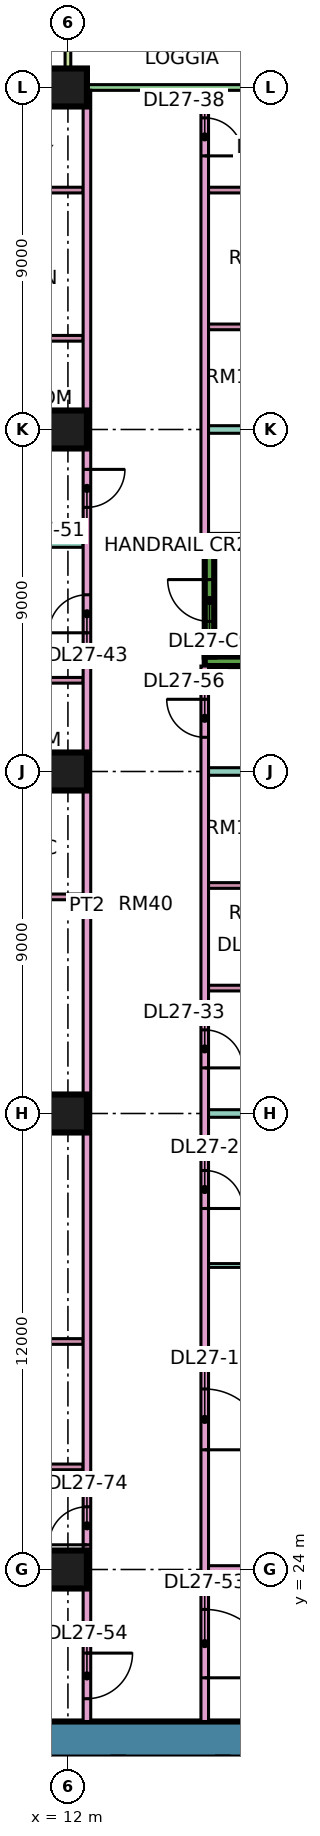
"""IFC4 building model, lengths in metres.
Left out: names, types, materials, properties, quantities, classifications, styles, units other than length and angle.
Written with IfcOpenShell. Run it as: python <this file> out.ifc"""

import sys

from ifc_helpers import new_model, si_unit, direction, frame, frame_2d, origin, origin_2d, place, context, subcontext, project, spatial, rectangle, extrude, element, fill, save


model = new_model("IFC4")
c1 = context("Model", 3, precision=1e-05, world=origin(), true_north=direction((0.0, 1.0)))
c2 = subcontext(c1, "Body", "Model", "MODEL_VIEW")
j1 = project(units=[si_unit("LENGTHUNIT", "METRE"), si_unit("PLANEANGLEUNIT", "RADIAN")], contexts=[c1])
p1 = place(None, origin())
s1 = spatial("IfcSite", under=j1, at=p1, CompositionType="ELEMENT")
p2 = place(p1, origin())
s2 = spatial("IfcBuilding", under=s1, at=p2, CompositionType="ELEMENT")
p3 = place(p2, frame((0.0, 0.0, 118.15)))
s3 = spatial("IfcBuildingStorey", under=s2, at=p3, CompositionType="ELEMENT", Elevation=118.15)
for number, where, z_axis, x_axis in (
    (1, (12.0, 24.0, 0.0), (0.0, 0.0, 1.0), (1.0, 0.0, 0.0)),
    (2, (12.0, 36.0, 0.0), (0.0, 0.0, 1.0), (1.0, 0.0, 0.0)),
    (3, (12.0, 45.0, 0.0), (0.0, 0.0, 1.0), (1.0, 0.0, 0.0)),
    (4, (12.0, 54.0, 0.0), (0.0, 0.0, 1.0), (1.0, 0.0, 0.0)),
    (5, (12.0, 63.0, 0.0), (0.0, 0.0, 1.0), (1.0, 0.0, 0.0)),
):
    element("IfcColumn", number, at=place(p3, frame(where, z_axis=z_axis, x_axis=x_axis)), inside=s3, PredefinedType="COLUMN", context=c2, shape_type="SweptSolid", body=[
        extrude(rectangle(XDim=1.0, YDim=1.0, at=origin_2d()), origin(), (0.0, 0.0, 1.0), 3.75),
    ])
p4 = place(p3, frame((9.0, 19.525, 0.0), z_axis=(0.0, 0.0, 1.0), x_axis=(1.0, 0.0, 0.0)))
e6 = element("IfcWall", 6, at=p4, inside=s3, PredefinedType="SHEAR", context=c2, shape_type="SweptSolid", body=[
    extrude(rectangle(XDim=25.0, YDim=0.95, at=frame_2d((12.5, 0.0))), origin(), (0.0, 0.0, 1.0), 3.75),
])
p5 = place(p4, frame((19.1, 0.0, 0.0)))
e7 = element("IfcOpeningElement", 7, at=p5, cuts=e6, PredefinedType="OPENING", context=c2, shape_type="SweptSolid", body=[
    extrude(rectangle(XDim=1.8, YDim=2.4, at=frame_2d((0.9, 1.2))), frame((0.0, 0.485, 0.0), z_axis=(0.0, -1.0, 0.0), x_axis=(1.0, 0.0, 0.0)), (0.0, 0.0, 1.0), 0.97),
])
for number, where, z_axis, x_axis in (
    (8, (15.6, 47.9, 0.0), (0.0, 0.0, 1.0), (1.0, 0.0, 0.0)),
    (9, (15.6, 51.1, 0.0), (0.0, 0.0, 1.0), (1.0, 0.0, 0.0)),
):
    element("IfcWall", number, at=place(p3, frame(where, z_axis=z_axis, x_axis=x_axis)), inside=s3, PredefinedType="SHEAR", context=c2, shape_type="SweptSolid", body=[
        extrude(rectangle(XDim=7.0, YDim=0.25, at=frame_2d((3.5, 0.0))), origin(), (0.0, 0.0, 1.0), 3.75),
    ])
p6 = place(p3, frame((15.725, 48.025, 0.0), z_axis=(0.0, 0.0, 1.0), x_axis=(0.0, 1.0, 0.0)))
e10 = element("IfcWall", 10, at=p6, inside=s3, PredefinedType="SHEAR", context=c2, shape_type="SweptSolid", body=[
    extrude(rectangle(XDim=2.95, YDim=0.25, at=frame_2d((1.475, 0.0))), origin(), (0.0, 0.0, 1.0), 3.75),
])
p7 = place(p6, frame((0.925, 0.0, 0.0)))
e11 = element("IfcOpeningElement", 11, at=p7, cuts=e10, PredefinedType="OPENING", context=c2, shape_type="SweptSolid", body=[
    extrude(rectangle(XDim=1.1, YDim=2.2, at=frame_2d((0.55, 1.1))), frame((0.0, 0.135, 0.0), z_axis=(0.0, -1.0, 0.0), x_axis=(1.0, 0.0, 0.0)), (0.0, 0.0, 1.0), 0.27),
])
p8 = place(p3, frame((22.425, 63.0, 0.0), z_axis=(0.0, 0.0, 1.0), x_axis=(-1.0, 0.0, 0.0)))
e12 = element("IfcWall", 12, at=p8, inside=s3, PredefinedType="SOLIDWALL", context=c2, shape_type="SweptSolid", body=[
    extrude(rectangle(XDim=10.35, YDim=0.15, at=frame_2d((5.175, 0.0))), origin(), (0.0, 0.0, 1.0), 3.35),
])
p9 = place(p8, frame((0.562, 0.0, 0.45)))
e13 = element("IfcOpeningElement", 13, at=p9, cuts=e12, PredefinedType="OPENING", context=c2, shape_type="SweptSolid", body=[
    extrude(rectangle(XDim=1.8, YDim=2.4, at=frame_2d((0.9, 1.2))), frame((0.0, 0.085, 0.0), z_axis=(0.0, -1.0, 0.0), x_axis=(1.0, 0.0, 0.0)), (0.0, 0.0, 1.0), 0.17),
])
p10 = place(p8, frame((3.975, 0.0, 0.0)))
e14 = element("IfcOpeningElement", 14, at=p10, cuts=e12, PredefinedType="OPENING", context=c2, shape_type="SweptSolid", body=[
    extrude(rectangle(XDim=1.8, YDim=2.4, at=frame_2d((0.9, 1.2))), frame((0.0, 0.085, 0.0), z_axis=(0.0, -1.0, 0.0), x_axis=(1.0, 0.0, 0.0)), (0.0, 0.0, 1.0), 0.17),
])
p11 = place(p3, frame((12.0, 64.5, 0.0), z_axis=(0.0, 0.0, 1.0), x_axis=(0.0, -1.0, 0.0)))
e15 = element("IfcWall", 15, at=p11, inside=s3, PredefinedType="SOLIDWALL", context=c2, shape_type="SweptSolid", body=[
    extrude(rectangle(XDim=1.5, YDim=0.15, at=frame_2d((0.75, 0.0))), origin(), (0.0, 0.0, 1.0), 3.35),
])
p12 = place(p3, frame((0.0, 36.0, 0.0), z_axis=(0.0, 0.0, 1.0), x_axis=(1.0, 0.0, 0.0)))
e16 = element("IfcWall", 16, at=p12, inside=s3, PredefinedType="PARTITIONING", context=c2, shape_type="SweptSolid", body=[
    extrude(rectangle(XDim=12.4, YDim=0.2, at=frame_2d((6.2, 0.0))), origin(), (0.0, 0.0, 1.0), 3.35),
])
p13 = place(p3, frame((-1.35, 51.0, 0.0), z_axis=(0.0, 0.0, 1.0), x_axis=(1.0, 0.0, 0.0)))
e17 = element("IfcWall", 17, at=p13, inside=s3, PredefinedType="PARTITIONING", context=c2, shape_type="SweptSolid", body=[
    extrude(rectangle(XDim=13.75, YDim=0.2, at=frame_2d((6.875, 0.0))), origin(), (0.0, 0.0, 1.0), 3.35),
])
p14 = place(p3, frame((0.074, 22.4, 0.0), z_axis=(0.0, 0.0, 1.0), x_axis=(1.0, 0.0, 0.0)))
e18 = element("IfcWall", 18, at=p14, inside=s3, PredefinedType="PARTITIONING", context=c2, shape_type="SweptSolid", body=[
    extrude(rectangle(XDim=12.326, YDim=0.2, at=frame_2d((6.163, 0.0))), origin(), (0.0, 0.0, 1.0), 3.35),
])
for number, where, z_axis, x_axis in (
    (19, (7.775, 26.7, 0.0), (0.0, 0.0, 1.0), (1.0, 0.0, 0.0)),
    (20, (7.775, 30.0, 0.0), (0.0, 0.0, 1.0), (1.0, 0.0, 0.0)),
    (21, (7.775, 41.7, 0.0), (0.0, 0.0, 1.0), (1.0, 0.0, 0.0)),
    (22, (7.775, 45.0, 0.0), (0.0, 0.0, 1.0), (1.0, 0.0, 0.0)),
    (23, (7.775, 47.4, 0.0), (0.0, 0.0, 1.0), (1.0, 0.0, 0.0)),
):
    element("IfcWall", number, at=place(p3, frame(where, z_axis=z_axis, x_axis=x_axis)), inside=s3, PredefinedType="PARTITIONING", context=c2, shape_type="SweptSolid", body=[
        extrude(rectangle(XDim=4.625, YDim=0.15, at=frame_2d((2.312, 0.0))), origin(), (0.0, 0.0, 1.0), 3.35),
    ])
for number, where, z_axis, x_axis in (
    (24, (8.375, 54.0, 0.0), (0.0, 0.0, 1.0), (1.0, 0.0, 0.0)),
    (25, (8.375, 56.4, 0.0), (0.0, 0.0, 1.0), (1.0, 0.0, 0.0)),
    (26, (8.375, 60.3, 0.0), (0.0, 0.0, 1.0), (1.0, 0.0, 0.0)),
):
    element("IfcWall", number, at=place(p3, frame(where, z_axis=z_axis, x_axis=x_axis)), inside=s3, PredefinedType="PARTITIONING", context=c2, shape_type="SweptSolid", body=[
        extrude(rectangle(XDim=4.025, YDim=0.15, at=frame_2d((2.012, 0.0))), origin(), (0.0, 0.0, 1.0), 3.35),
    ])
p15 = place(p3, frame((12.5, 20.0, 0.0), z_axis=(0.0, 0.0, 1.0), x_axis=(0.0, 1.0, 0.0)))
e27 = element("IfcWall", 27, at=p15, inside=s3, PredefinedType="PARTITIONING", context=c2, shape_type="SweptSolid", body=[
    extrude(rectangle(XDim=42.926, YDim=0.2, at=frame_2d((21.463, 0.0))), origin(), (0.0, 0.0, 1.0), 3.35),
])
p16 = place(p15, frame((28.65, 0.0, 0.0)))
e28 = element("IfcOpeningElement", 28, at=p16, cuts=e27, PredefinedType="OPENING", context=c2, shape_type="SweptSolid", body=[
    extrude(rectangle(XDim=1.0, YDim=2.1, at=frame_2d((0.5, 1.05))), frame((0.0, 0.11, 0.0), z_axis=(0.0, -1.0, 0.0), x_axis=(1.0, 0.0, 0.0)), (0.0, 0.0, 1.0), 0.22),
])
p17 = place(p15, frame((31.95, 0.0, 0.0)))
e29 = element("IfcOpeningElement", 29, at=p17, cuts=e27, PredefinedType="OPENING", context=c2, shape_type="SweptSolid", body=[
    extrude(rectangle(XDim=1.0, YDim=2.1, at=frame_2d((0.5, 1.05))), frame((0.0, 0.11, 0.0), z_axis=(0.0, -1.0, 0.0), x_axis=(1.0, 0.0, 0.0)), (0.0, 0.0, 1.0), 0.22),
])
p18 = place(p15, frame((0.6, 0.0, 0.0)))
e30 = element("IfcOpeningElement", 30, at=p18, cuts=e27, PredefinedType="OPENING", context=c2, shape_type="SweptSolid", body=[
    extrude(rectangle(XDim=1.2, YDim=2.1, at=frame_2d((0.6, 1.05))), frame((0.0, 0.11, 0.0), z_axis=(0.0, -1.0, 0.0), x_axis=(1.0, 0.0, 0.0)), (0.0, 0.0, 1.0), 0.22),
])
p19 = place(p15, frame((4.65, 0.0, 0.0)))
e31 = element("IfcOpeningElement", 31, at=p19, cuts=e27, PredefinedType="OPENING", context=c2, shape_type="SweptSolid", body=[
    extrude(rectangle(XDim=1.0, YDim=2.1, at=frame_2d((0.5, 1.05))), frame((0.0, 0.11, 0.0), z_axis=(0.0, -1.0, 0.0), x_axis=(1.0, 0.0, 0.0)), (0.0, 0.0, 1.0), 0.22),
])
p20 = place(p3, frame((15.6, 20.0, 0.0), z_axis=(0.0, 0.0, 1.0), x_axis=(0.0, 1.0, 0.0)))
e32 = element("IfcWall", 32, at=p20, inside=s3, PredefinedType="PARTITIONING", context=c2, shape_type="SweptSolid", body=[
    extrude(rectangle(XDim=27.775, YDim=0.2, at=frame_2d((13.887, 0.0))), origin(), (0.0, 0.0, 1.0), 3.35),
])
p21 = place(p20, frame((7.15, 0.0, 0.0)))
e33 = element("IfcOpeningElement", 33, at=p21, cuts=e32, PredefinedType="OPENING", context=c2, shape_type="SweptSolid", body=[
    extrude(rectangle(XDim=1.6, YDim=2.1, at=frame_2d((0.8, 1.05))), frame((0.0, 0.11, 0.0), z_axis=(0.0, -1.0, 0.0), x_axis=(1.0, 0.0, 0.0)), (0.0, 0.0, 1.0), 0.22),
])
p22 = place(p20, frame((13.5, 0.0, 0.0)))
e34 = element("IfcOpeningElement", 34, at=p22, cuts=e32, PredefinedType="OPENING", context=c2, shape_type="SweptSolid", body=[
    extrude(rectangle(XDim=1.0, YDim=2.1, at=frame_2d((0.5, 1.05))), frame((0.0, 0.11, 0.0), z_axis=(0.0, -1.0, 0.0), x_axis=(1.0, 0.0, 0.0)), (0.0, 0.0, 1.0), 0.22),
])
p23 = place(p20, frame((17.2, 0.0, 0.0)))
e35 = element("IfcOpeningElement", 35, at=p23, cuts=e32, PredefinedType="OPENING", context=c2, shape_type="SweptSolid", body=[
    extrude(rectangle(XDim=1.0, YDim=2.1, at=frame_2d((0.5, 1.05))), frame((0.0, 0.11, 0.0), z_axis=(0.0, -1.0, 0.0), x_axis=(1.0, 0.0, 0.0)), (0.0, 0.0, 1.0), 0.22),
])
p24 = place(p20, frame((1.15, 0.0, 0.0)))
e36 = element("IfcOpeningElement", 36, at=p24, cuts=e32, PredefinedType="OPENING", context=c2, shape_type="SweptSolid", body=[
    extrude(rectangle(XDim=1.8, YDim=2.1, at=frame_2d((0.9, 1.05))), frame((0.0, 0.11, 0.0), z_axis=(0.0, -1.0, 0.0), x_axis=(1.0, 0.0, 0.0)), (0.0, 0.0, 1.0), 0.22),
])
p25 = place(p20, frame((25.9, 0.0, 0.0)))
e37 = element("IfcOpeningElement", 37, at=p25, cuts=e32, PredefinedType="OPENING", context=c2, shape_type="SweptSolid", body=[
    extrude(rectangle(XDim=1.0, YDim=2.1, at=frame_2d((0.5, 1.05))), frame((0.0, 0.11, 0.0), z_axis=(0.0, -1.0, 0.0), x_axis=(1.0, 0.0, 0.0)), (0.0, 0.0, 1.0), 0.22),
])
p26 = place(p3, frame((15.6, 51.225, 0.0), z_axis=(0.0, 0.0, 1.0), x_axis=(0.0, 1.0, 0.0)))
e38 = element("IfcWall", 38, at=p26, inside=s3, PredefinedType="PARTITIONING", context=c2, shape_type="SweptSolid", body=[
    extrude(rectangle(XDim=11.701, YDim=0.2, at=frame_2d((5.851, 0.0))), origin(), (0.0, 0.0, 1.0), 3.35),
])
p27 = place(p26, frame((9.975, 0.0, 0.0)))
e39 = element("IfcOpeningElement", 39, at=p27, cuts=e38, PredefinedType="OPENING", context=c2, shape_type="SweptSolid", body=[
    extrude(rectangle(XDim=1.0, YDim=2.1, at=frame_2d((0.5, 1.05))), frame((0.0, 0.11, 0.0), z_axis=(0.0, -1.0, 0.0), x_axis=(1.0, 0.0, 0.0)), (0.0, 0.0, 1.0), 0.22),
])
p28 = place(p3, frame((15.7, 24.0, 0.0), z_axis=(0.0, 0.0, 1.0), x_axis=(1.0, 0.0, 0.0)))
e40 = element("IfcWall", 40, at=p28, inside=s3, PredefinedType="PARTITIONING", context=c2, shape_type="SweptSolid", body=[
    extrude(rectangle(XDim=5.8, YDim=0.2, at=frame_2d((2.9, 0.0))), origin(), (0.0, 0.0, 1.0), 3.35),
])
p29 = place(p3, frame((15.7, 32.0, 0.0), z_axis=(0.0, 0.0, 1.0), x_axis=(1.0, 0.0, 0.0)))
e41 = element("IfcWall", 41, at=p29, inside=s3, PredefinedType="PARTITIONING", context=c2, shape_type="SweptSolid", body=[
    extrude(rectangle(XDim=5.8, YDim=0.1, at=frame_2d((2.9, 0.0))), origin(), (0.0, 0.0, 1.0), 3.35),
])
p30 = place(p3, frame((15.7, 36.0, 0.0), z_axis=(0.0, 0.0, 1.0), x_axis=(1.0, 0.0, 0.0)))
e42 = element("IfcWall", 42, at=p30, inside=s3, PredefinedType="PARTITIONING", context=c2, shape_type="SweptSolid", body=[
    extrude(rectangle(XDim=8.3, YDim=0.2, at=frame_2d((4.15, 0.0))), origin(), (0.0, 0.0, 1.0), 3.35),
])
p31 = place(p3, frame((15.7, 39.3, 0.0), z_axis=(0.0, 0.0, 1.0), x_axis=(1.0, 0.0, 0.0)))
e43 = element("IfcWall", 43, at=p31, inside=s3, PredefinedType="PARTITIONING", context=c2, shape_type="SweptSolid", body=[
    extrude(rectangle(XDim=2.525, YDim=0.15, at=frame_2d((1.263, 0.0))), origin(), (0.0, 0.0, 1.0), 3.35),
])
p32 = place(p31, frame((0.9, 0.0, 0.0)))
e44 = element("IfcOpeningElement", 44, at=p32, cuts=e43, PredefinedType="OPENING", context=c2, shape_type="SweptSolid", body=[
    extrude(rectangle(XDim=0.8, YDim=2.1, at=frame_2d((0.4, 1.05))), frame((0.0, 0.085, 0.0), z_axis=(0.0, -1.0, 0.0), x_axis=(1.0, 0.0, 0.0)), (0.0, 0.0, 1.0), 0.17),
])
p33 = place(p3, frame((15.7, 42.0, 0.0), z_axis=(0.0, 0.0, 1.0), x_axis=(1.0, 0.0, 0.0)))
e45 = element("IfcWall", 45, at=p33, inside=s3, PredefinedType="PARTITIONING", context=c2, shape_type="SweptSolid", body=[
    extrude(rectangle(XDim=2.525, YDim=0.15, at=frame_2d((1.263, 0.0))), origin(), (0.0, 0.0, 1.0), 3.35),
])
p34 = place(p3, frame((15.7, 45.0, 0.0), z_axis=(0.0, 0.0, 1.0), x_axis=(1.0, 0.0, 0.0)))
e46 = element("IfcWall", 46, at=p34, inside=s3, PredefinedType="PARTITIONING", context=c2, shape_type="SweptSolid", body=[
    extrude(rectangle(XDim=8.226, YDim=0.2, at=frame_2d((4.113, 0.0))), origin(), (0.0, 0.0, 1.0), 3.35),
])
p35 = place(p3, frame((15.7, 54.0, 0.0), z_axis=(0.0, 0.0, 1.0), x_axis=(1.0, 0.0, 0.0)))
e47 = element("IfcWall", 47, at=p35, inside=s3, PredefinedType="PARTITIONING", context=c2, shape_type="SweptSolid", body=[
    extrude(rectangle(XDim=8.3, YDim=0.2, at=frame_2d((4.15, 0.0))), origin(), (0.0, 0.0, 1.0), 3.35),
])
for number, where, z_axis, x_axis in (
    (48, (15.7, 56.7, 0.0), (0.0, 0.0, 1.0), (1.0, 0.0, 0.0)),
    (49, (15.7, 60.3, 0.0), (0.0, 0.0, 1.0), (1.0, 0.0, 0.0)),
):
    element("IfcWall", number, at=place(p3, frame(where, z_axis=z_axis, x_axis=x_axis)), inside=s3, PredefinedType="PARTITIONING", context=c2, shape_type="SweptSolid", body=[
        extrude(rectangle(XDim=2.525, YDim=0.15, at=frame_2d((1.263, 0.0))), origin(), (0.0, 0.0, 1.0), 3.35),
    ])
p36 = place(p7, frame((1.1, 0.0, 0.0), z_axis=(0.0, 0.0, 1.0), x_axis=(-1.0, 0.0, 0.0)))
e50 = element("IfcDoor", 50, at=p36, inside=s3, OperationType="SINGLE_SWING_RIGHT", PredefinedType="DOOR", context=c2, shape_type="SweptSolid", body=[
    extrude(rectangle(XDim=1.1, YDim=2.2, at=frame_2d((0.55, 1.1))), frame((0.0, 0.025, 0.0), z_axis=(0.0, -1.0, 0.0), x_axis=(1.0, 0.0, 0.0)), (0.0, 0.0, 1.0), 0.05),
])
fill(e11, e50)
p37 = place(p21, frame((1.6, 0.0, 0.0), z_axis=(0.0, 0.0, 1.0), x_axis=(-1.0, 0.0, 0.0)))
e51 = element("IfcDoor", 51, at=p37, inside=s3, OperationType="DOUBLE_DOOR_SINGLE_SWING", PredefinedType="DOOR", context=c2, shape_type="SweptSolid", body=[
    extrude(rectangle(XDim=1.6, YDim=2.1, at=frame_2d((0.8, 1.05))), frame((0.0, 0.025, 0.0), z_axis=(0.0, -1.0, 0.0), x_axis=(1.0, 0.0, 0.0)), (0.0, 0.0, 1.0), 0.05),
])
fill(e33, e51)
p38 = place(p22, frame((1.0, 0.0, 0.0), z_axis=(0.0, 0.0, 1.0), x_axis=(-1.0, 0.0, 0.0)))
e52 = element("IfcDoor", 52, at=p38, inside=s3, OperationType="SINGLE_SWING_LEFT", PredefinedType="DOOR", context=c2, shape_type="SweptSolid", body=[
    extrude(rectangle(XDim=1.0, YDim=2.1, at=frame_2d((0.5, 1.05))), frame((0.0, 0.025, 0.0), z_axis=(0.0, -1.0, 0.0), x_axis=(1.0, 0.0, 0.0)), (0.0, 0.0, 1.0), 0.05),
])
fill(e34, e52)
p39 = place(p23, frame((1.0, 0.0, 0.0), z_axis=(0.0, 0.0, 1.0), x_axis=(-1.0, 0.0, 0.0)))
e53 = element("IfcDoor", 53, at=p39, inside=s3, OperationType="SINGLE_SWING_LEFT", PredefinedType="DOOR", context=c2, shape_type="SweptSolid", body=[
    extrude(rectangle(XDim=1.0, YDim=2.1, at=frame_2d((0.5, 1.05))), frame((0.0, 0.025, 0.0), z_axis=(0.0, -1.0, 0.0), x_axis=(1.0, 0.0, 0.0)), (0.0, 0.0, 1.0), 0.05),
])
fill(e35, e53)
p40 = place(p27, frame((1.0, 0.0, 0.0), z_axis=(0.0, 0.0, 1.0), x_axis=(-1.0, 0.0, 0.0)))
e54 = element("IfcDoor", 54, at=p40, inside=s3, OperationType="SINGLE_SWING_LEFT", PredefinedType="DOOR", context=c2, shape_type="SweptSolid", body=[
    extrude(rectangle(XDim=1.0, YDim=2.1, at=frame_2d((0.5, 1.05))), frame((0.0, 0.025, 0.0), z_axis=(0.0, -1.0, 0.0), x_axis=(1.0, 0.0, 0.0)), (0.0, 0.0, 1.0), 0.05),
])
fill(e39, e54)
p41 = place(p16, origin())
e55 = element("IfcDoor", 55, at=p41, inside=s3, OperationType="SINGLE_SWING_LEFT", PredefinedType="DOOR", context=c2, shape_type="SweptSolid", body=[
    extrude(rectangle(XDim=1.0, YDim=2.1, at=frame_2d((0.5, 1.05))), frame((0.0, 0.025, 0.0), z_axis=(0.0, -1.0, 0.0), x_axis=(1.0, 0.0, 0.0)), (0.0, 0.0, 1.0), 0.05),
])
fill(e28, e55)
p42 = place(p17, origin())
e56 = element("IfcDoor", 56, at=p42, inside=s3, OperationType="SINGLE_SWING_RIGHT", PredefinedType="DOOR", context=c2, shape_type="SweptSolid", body=[
    extrude(rectangle(XDim=1.0, YDim=2.1, at=frame_2d((0.5, 1.05))), frame((0.0, 0.025, 0.0), z_axis=(0.0, -1.0, 0.0), x_axis=(1.0, 0.0, 0.0)), (0.0, 0.0, 1.0), 0.05),
])
fill(e29, e56)
p43 = place(p24, frame((1.8, 0.0, 0.0), z_axis=(0.0, 0.0, 1.0), x_axis=(-1.0, 0.0, 0.0)))
e57 = element("IfcDoor", 57, at=p43, inside=s3, OperationType="DOUBLE_DOOR_SINGLE_SWING", PredefinedType="DOOR", context=c2, shape_type="SweptSolid", body=[
    extrude(rectangle(XDim=1.8, YDim=2.1, at=frame_2d((0.9, 1.05))), frame((0.0, 0.025, 0.0), z_axis=(0.0, -1.0, 0.0), x_axis=(1.0, 0.0, 0.0)), (0.0, 0.0, 1.0), 0.05),
])
fill(e36, e57)
p44 = place(p18, origin())
e58 = element("IfcDoor", 58, at=p44, inside=s3, OperationType="SINGLE_SWING_RIGHT", PredefinedType="DOOR", context=c2, shape_type="SweptSolid", body=[
    extrude(rectangle(XDim=1.2, YDim=2.1, at=frame_2d((0.6, 1.05))), frame((0.0, 0.025, 0.0), z_axis=(0.0, -1.0, 0.0), x_axis=(1.0, 0.0, 0.0)), (0.0, 0.0, 1.0), 0.05),
])
fill(e30, e58)
p45 = place(p25, frame((1.0, 0.0, 0.0), z_axis=(0.0, 0.0, 1.0), x_axis=(-1.0, 0.0, 0.0)))
e59 = element("IfcDoor", 59, at=p45, inside=s3, OperationType="SINGLE_SWING_RIGHT", PredefinedType="DOOR", context=c2, shape_type="SweptSolid", body=[
    extrude(rectangle(XDim=1.0, YDim=2.1, at=frame_2d((0.5, 1.05))), frame((0.0, 0.025, 0.0), z_axis=(0.0, -1.0, 0.0), x_axis=(1.0, 0.0, 0.0)), (0.0, 0.0, 1.0), 0.05),
])
fill(e37, e59)
p46 = place(p19, origin())
e60 = element("IfcDoor", 60, at=p46, inside=s3, OperationType="SINGLE_SWING_LEFT", PredefinedType="DOOR", context=c2, shape_type="SweptSolid", body=[
    extrude(rectangle(XDim=1.0, YDim=2.1, at=frame_2d((0.5, 1.05))), frame((0.0, 0.025, 0.0), z_axis=(0.0, -1.0, 0.0), x_axis=(1.0, 0.0, 0.0)), (0.0, 0.0, 1.0), 0.05),
])
fill(e31, e60)
save(model, sys.argv[1])
